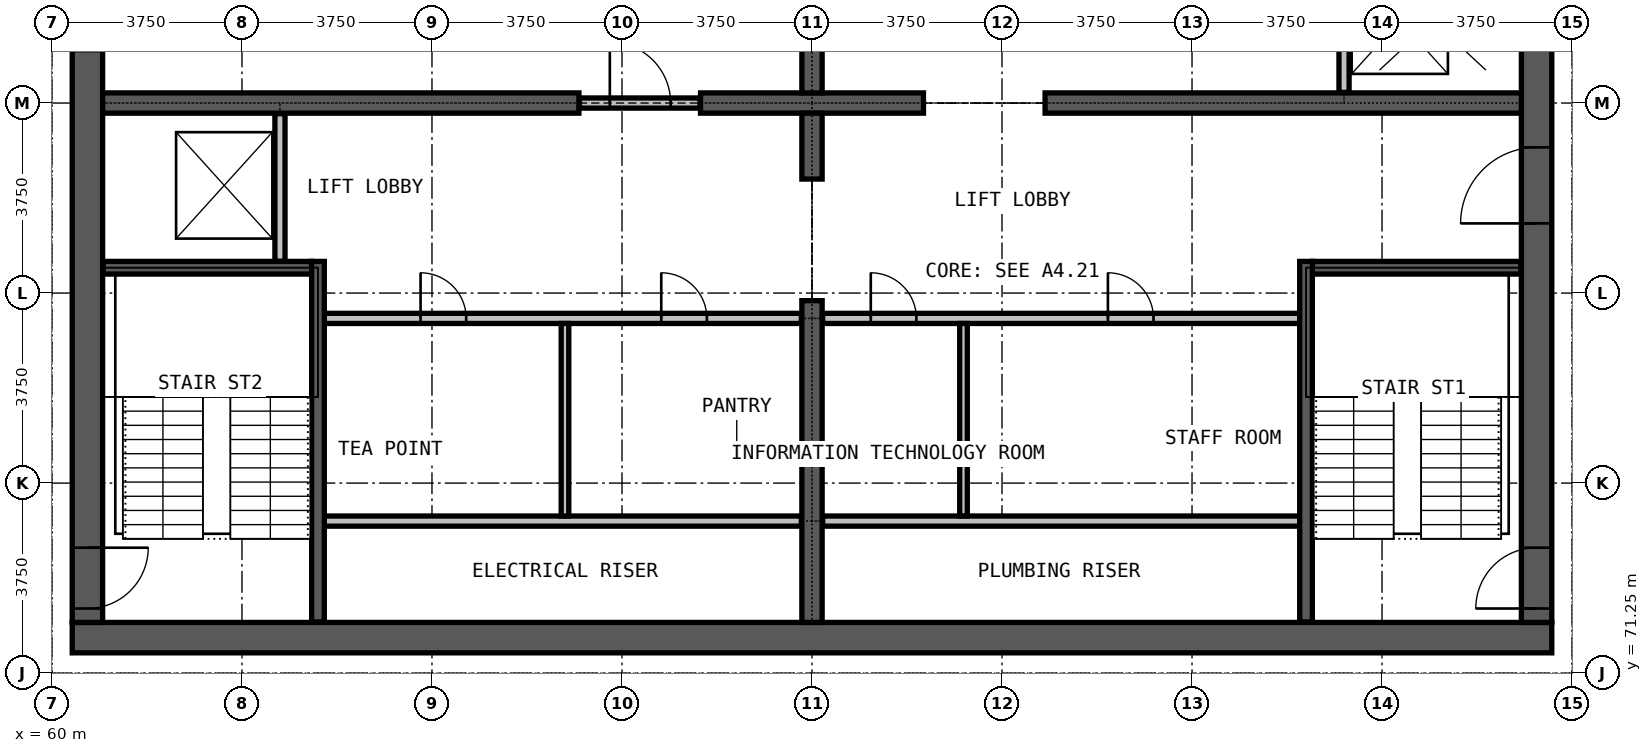
"""IFC4 building model, lengths in metres.
Left out: names, types, materials, properties, quantities, classifications, styles, units other than length and angle.
Written with IfcOpenShell. Run it as: python <this file> out.ifc"""

import sys

from ifc_helpers import new_model, si_unit, direction, frame, frame_2d, origin, place, context, subcontext, project, spatial, rectangle, extrude, element, fill, save


model = new_model("IFC4")
c1 = context("Model", 3, precision=1e-05, world=origin(), true_north=direction((0.0, 1.0)))
c2 = subcontext(c1, "Body", "Model", "MODEL_VIEW")
j1 = project(units=[si_unit("LENGTHUNIT", "METRE"), si_unit("PLANEANGLEUNIT", "RADIAN")], contexts=[c1])
p1 = place(None, origin())
s1 = spatial("IfcSite", under=j1, at=p1, CompositionType="ELEMENT")
p2 = place(p1, origin())
s2 = spatial("IfcBuilding", under=s1, at=p2, CompositionType="ELEMENT")
p3 = place(p2, frame((0.0, 0.0, 231.9)))
s3 = spatial("IfcBuildingStorey", under=s2, at=p3, CompositionType="ELEMENT", Elevation=231.9)
p4 = place(p3, frame((60.4, 71.95, 0.0), z_axis=(0.0, 0.0, 1.0), x_axis=(1.0, 0.0, 0.0)))
e1 = element("IfcWall", 1, at=p4, inside=s3, PredefinedType="SHEAR", context=c2, shape_type="SweptSolid", body=[
    extrude(rectangle(XDim=29.2, YDim=0.6, at=frame_2d((14.6, 0.0))), origin(), (0.0, 0.0, 1.0), 3.6),
])
p5 = place(p3, frame((89.3, 72.25, 0.0), z_axis=(0.0, 0.0, 1.0), x_axis=(0.0, 1.0, 0.0)))
e2 = element("IfcWall", 2, at=p5, inside=s3, PredefinedType="SHEAR", context=c2, shape_type="SweptSolid", body=[
    extrude(rectangle(XDim=20.5, YDim=0.6, at=frame_2d((10.25, 0.0))), origin(), (0.0, 0.0, 1.0), 3.6),
])
p6 = place(p5, frame((0.275, 0.0, 0.0)))
e3 = element("IfcOpeningElement", 3, at=p6, cuts=e2, PredefinedType="OPENING", context=c2, shape_type="SweptSolid", body=[
    extrude(rectangle(XDim=1.2, YDim=2.2, at=frame_2d((0.6, 1.1))), frame((0.0, 0.31, 0.0), z_axis=(0.0, -1.0, 0.0), x_axis=(1.0, 0.0, 0.0)), (0.0, 0.0, 1.0), 0.62),
])
p7 = place(p5, frame((13.775, 0.0, 0.0)))
e4 = element("IfcOpeningElement", 4, at=p7, cuts=e2, PredefinedType="OPENING", context=c2, shape_type="SweptSolid", body=[
    extrude(rectangle(XDim=1.2, YDim=2.2, at=frame_2d((0.6, 1.1))), frame((0.0, 0.31, 0.0), z_axis=(0.0, -1.0, 0.0), x_axis=(1.0, 0.0, 0.0)), (0.0, 0.0, 1.0), 0.62),
])
p8 = place(p5, frame((7.875, 0.0, 0.0)))
e5 = element("IfcOpeningElement", 5, at=p8, cuts=e2, PredefinedType="OPENING", context=c2, shape_type="SweptSolid", body=[
    extrude(rectangle(XDim=1.5, YDim=2.2, at=frame_2d((0.75, 1.1))), frame((0.0, 0.31, 0.0), z_axis=(0.0, -1.0, 0.0), x_axis=(1.0, 0.0, 0.0)), (0.0, 0.0, 1.0), 0.62),
])
p9 = place(p3, frame((60.7, 92.75, 0.0), z_axis=(0.0, 0.0, 1.0), x_axis=(0.0, -1.0, 0.0)))
e6 = element("IfcWall", 6, at=p9, inside=s3, PredefinedType="SHEAR", context=c2, shape_type="SweptSolid", body=[
    extrude(rectangle(XDim=20.5, YDim=0.6, at=frame_2d((10.25, 0.0))), origin(), (0.0, 0.0, 1.0), 3.6),
])
p10 = place(p9, frame((19.025, 0.0, 0.0)))
e7 = element("IfcOpeningElement", 7, at=p10, cuts=e6, PredefinedType="OPENING", context=c2, shape_type="SweptSolid", body=[
    extrude(rectangle(XDim=1.2, YDim=2.2, at=frame_2d((0.6, 1.1))), frame((0.0, 0.31, 0.0), z_axis=(0.0, -1.0, 0.0), x_axis=(1.0, 0.0, 0.0)), (0.0, 0.0, 1.0), 0.62),
])
p11 = place(p9, frame((8.025, 0.0, 0.0)))
e8 = element("IfcOpeningElement", 8, at=p11, cuts=e6, PredefinedType="OPENING", context=c2, shape_type="SweptSolid", body=[
    extrude(rectangle(XDim=1.2, YDim=2.2, at=frame_2d((0.6, 1.1))), frame((0.0, 0.31, 0.0), z_axis=(0.0, -1.0, 0.0), x_axis=(1.0, 0.0, 0.0)), (0.0, 0.0, 1.0), 0.62),
])
p12 = place(p3, frame((61.0, 82.5, 0.0), z_axis=(0.0, 0.0, 1.0), x_axis=(1.0, 0.0, 0.0)))
e9 = element("IfcWall", 9, at=p12, inside=s3, PredefinedType="SHEAR", context=c2, shape_type="SweptSolid", body=[
    extrude(rectangle(XDim=9.4, YDim=0.4, at=frame_2d((4.7, 0.0))), origin(), (0.0, 0.0, 1.0), 3.6),
])
p13 = place(p3, frame((72.8, 82.5, 0.0), z_axis=(0.0, 0.0, 1.0), x_axis=(1.0, 0.0, 0.0)))
e10 = element("IfcWall", 10, at=p13, inside=s3, PredefinedType="SHEAR", context=c2, shape_type="SweptSolid", body=[
    extrude(rectangle(XDim=4.4, YDim=0.4, at=frame_2d((2.2, 0.0))), origin(), (0.0, 0.0, 1.0), 3.6),
])
p14 = place(p3, frame((79.6, 82.5, 0.0), z_axis=(0.0, 0.0, 1.0), x_axis=(1.0, 0.0, 0.0)))
e11 = element("IfcWall", 11, at=p14, inside=s3, PredefinedType="SHEAR", context=c2, shape_type="SweptSolid", body=[
    extrude(rectangle(XDim=9.4, YDim=0.4, at=frame_2d((4.7, 0.0))), origin(), (0.0, 0.0, 1.0), 3.6),
])
p15 = place(p3, frame((75.0, 72.25, 0.0), z_axis=(0.0, 0.0, 1.0), x_axis=(0.0, 1.0, 0.0)))
e12 = element("IfcWall", 12, at=p15, inside=s3, PredefinedType="SHEAR", context=c2, shape_type="SweptSolid", body=[
    extrude(rectangle(XDim=6.35, YDim=0.4, at=frame_2d((3.175, 0.0))), origin(), (0.0, 0.0, 1.0), 3.6),
])
for number, where, z_axis, x_axis in (
    (13, (75.0, 81.0, 0.0), (0.0, 0.0, 1.0), (0.0, 1.0, 0.0)),
    (14, (75.0, 82.7, 0.0), (0.0, 0.0, 1.0), (0.0, 1.0, 0.0)),
):
    element("IfcWall", number, at=place(p3, frame(where, z_axis=z_axis, x_axis=x_axis)), inside=s3, PredefinedType="SHEAR", context=c2, shape_type="SweptSolid", body=[
        extrude(rectangle(XDim=1.3, YDim=0.4, at=frame_2d((0.65, 0.0))), origin(), (0.0, 0.0, 1.0), 3.6),
    ])
for number, where, z_axis, x_axis in (
    (15, (65.375, 74.25, 0.0), (0.0, 0.0, 1.0), (1.0, 0.0, 0.0)),
    (16, (75.21, 74.25, 0.0), (0.0, 0.0, 1.0), (1.0, 0.0, 0.0)),
):
    element("IfcWall", number, at=place(p3, frame(where, z_axis=z_axis, x_axis=x_axis)), inside=s3, PredefinedType="PARTITIONING", context=c2, shape_type="SweptSolid", body=[
        extrude(rectangle(XDim=9.415, YDim=0.2, at=frame_2d((4.708, 0.0))), origin(), (0.0, 0.0, 1.0), 3.3),
    ])
p16 = place(p3, frame((65.375, 78.25, 0.0), z_axis=(0.0, 0.0, 1.0), x_axis=(1.0, 0.0, 0.0)))
e17 = element("IfcWall", 17, at=p16, inside=s3, PredefinedType="PARTITIONING", context=c2, shape_type="SweptSolid", body=[
    extrude(rectangle(XDim=9.415, YDim=0.2, at=frame_2d((4.708, 0.0))), origin(), (0.0, 0.0, 1.0), 3.3),
])
p17 = place(p16, frame((1.9, 0.0, 0.0)))
e18 = element("IfcOpeningElement", 18, at=p17, cuts=e17, PredefinedType="OPENING", context=c2, shape_type="SweptSolid", body=[
    extrude(rectangle(XDim=0.9, YDim=2.2, at=frame_2d((0.45, 1.1))), frame((0.0, 0.11, 0.0), z_axis=(0.0, -1.0, 0.0), x_axis=(1.0, 0.0, 0.0)), (0.0, 0.0, 1.0), 0.22),
])
p18 = place(p16, frame((6.65, 0.0, 0.0)))
e19 = element("IfcOpeningElement", 19, at=p18, cuts=e17, PredefinedType="OPENING", context=c2, shape_type="SweptSolid", body=[
    extrude(rectangle(XDim=0.9, YDim=2.2, at=frame_2d((0.45, 1.1))), frame((0.0, 0.11, 0.0), z_axis=(0.0, -1.0, 0.0), x_axis=(1.0, 0.0, 0.0)), (0.0, 0.0, 1.0), 0.22),
])
p19 = place(p3, frame((75.21, 78.25, 0.0), z_axis=(0.0, 0.0, 1.0), x_axis=(1.0, 0.0, 0.0)))
e20 = element("IfcWall", 20, at=p19, inside=s3, PredefinedType="PARTITIONING", context=c2, shape_type="SweptSolid", body=[
    extrude(rectangle(XDim=9.415, YDim=0.2, at=frame_2d((4.708, 0.0))), origin(), (0.0, 0.0, 1.0), 3.3),
])
p20 = place(p19, frame((0.95, 0.0, 0.0)))
e21 = element("IfcOpeningElement", 21, at=p20, cuts=e20, PredefinedType="OPENING", context=c2, shape_type="SweptSolid", body=[
    extrude(rectangle(XDim=0.9, YDim=2.2, at=frame_2d((0.45, 1.1))), frame((0.0, 0.11, 0.0), z_axis=(0.0, -1.0, 0.0), x_axis=(1.0, 0.0, 0.0)), (0.0, 0.0, 1.0), 0.22),
])
p21 = place(p19, frame((5.63, 0.0, 0.0)))
e22 = element("IfcOpeningElement", 22, at=p21, cuts=e20, PredefinedType="OPENING", context=c2, shape_type="SweptSolid", body=[
    extrude(rectangle(XDim=0.9, YDim=2.2, at=frame_2d((0.45, 1.1))), frame((0.0, 0.11, 0.0), z_axis=(0.0, -1.0, 0.0), x_axis=(1.0, 0.0, 0.0)), (0.0, 0.0, 1.0), 0.22),
])
p22 = place(p3, frame((70.41, 82.5, 0.0), z_axis=(0.0, 0.0, 1.0), x_axis=(1.0, 0.0, 0.0)))
e23 = element("IfcWall", 23, at=p22, inside=s3, PredefinedType="PARTITIONING", context=c2, shape_type="SweptSolid", body=[
    extrude(rectangle(XDim=2.38, YDim=0.2, at=frame_2d((1.19, 0.0))), origin(), (0.0, 0.0, 1.0), 2.4),
])
p23 = place(p22, frame((0.6, 0.0, 0.0)))
e24 = element("IfcOpeningElement", 24, at=p23, cuts=e23, PredefinedType="OPENING", context=c2, shape_type="SweptSolid", body=[
    extrude(rectangle(XDim=1.2, YDim=2.2, at=frame_2d((0.6, 1.1))), frame((0.0, 0.11, 0.0), z_axis=(0.0, -1.0, 0.0), x_axis=(1.0, 0.0, 0.0)), (0.0, 0.0, 1.0), 0.22),
])
for number, where, z_axis, x_axis in (
    (25, (70.125, 74.35, 0.0), (0.0, 0.0, 1.0), (0.0, 1.0, 0.0)),
    (26, (77.99, 74.35, 0.0), (0.0, 0.0, 1.0), (0.0, 1.0, 0.0)),
):
    element("IfcWall", number, at=place(p3, frame(where, z_axis=z_axis, x_axis=x_axis)), inside=s3, PredefinedType="PARTITIONING", context=c2, shape_type="SweptSolid", body=[
        extrude(rectangle(XDim=3.8, YDim=0.15, at=frame_2d((1.9, 0.0))), origin(), (0.0, 0.0, 1.0), 3.3),
    ])
p24 = place(p3, frame((64.5, 79.375, 0.0), z_axis=(0.0, 0.0, 1.0), x_axis=(0.0, 1.0, 0.0)))
e27 = element("IfcWall", 27, at=p24, inside=s3, PredefinedType="PARTITIONING", context=c2, shape_type="SweptSolid", body=[
    extrude(rectangle(XDim=2.915, YDim=0.2, at=frame_2d((1.458, 0.0))), origin(), (0.0, 0.0, 1.0), 3.3),
])
p25 = place(p3, frame((85.5, 82.71, 0.0), z_axis=(0.0, 0.0, 1.0), x_axis=(0.0, 1.0, 0.0)))
e28 = element("IfcWall", 28, at=p25, inside=s3, PredefinedType="PARTITIONING", context=c2, shape_type="SweptSolid", body=[
    extrude(rectangle(XDim=2.915, YDim=0.2, at=frame_2d((1.458, 0.0))), origin(), (0.0, 0.0, 1.0), 3.3),
])
p26 = place(p25, frame((0.9, 0.0, 0.0)))
e29 = element("IfcOpeningElement", 29, at=p26, cuts=e28, PredefinedType="OPENING", context=c2, shape_type="SweptSolid", body=[
    extrude(rectangle(XDim=1.1, YDim=2.2, at=frame_2d((0.55, 1.1))), frame((0.0, 0.11, 0.0), z_axis=(0.0, -1.0, 0.0), x_axis=(1.0, 0.0, 0.0)), (0.0, 0.0, 1.0), 0.22),
])
for number, where, z_axis, x_axis in (
    (30, (61.01, 79.25, 0.0), (0.0, 0.0, 1.0), (1.0, 0.0, 0.0)),
    (31, (84.875, 79.25, 0.0), (0.0, 0.0, 1.0), (1.0, 0.0, 0.0)),
):
    element("IfcWall", number, at=place(p3, frame(where, z_axis=z_axis, x_axis=x_axis)), inside=s3, PredefinedType="PARTITIONING", context=c2, shape_type="SweptSolid", body=[
        extrude(rectangle(XDim=4.115, YDim=0.25, at=frame_2d((2.058, 0.0))), origin(), (0.0, 0.0, 1.0), 3.3),
    ])
for number, where, z_axis, x_axis in (
    (32, (65.25, 72.26, 0.0), (0.0, 0.0, 1.0), (0.0, 1.0, 0.0)),
    (33, (84.75, 72.26, 0.0), (0.0, 0.0, 1.0), (0.0, 1.0, 0.0)),
):
    element("IfcWall", number, at=place(p3, frame(where, z_axis=z_axis, x_axis=x_axis)), inside=s3, PredefinedType="PARTITIONING", context=c2, shape_type="SweptSolid", body=[
        extrude(rectangle(XDim=7.115, YDim=0.25, at=frame_2d((3.558, 0.0))), origin(), (0.0, 0.0, 1.0), 3.3),
    ])
p27 = place(p23, origin())
e34 = element("IfcDoor", 34, at=p27, inside=s3, OperationType="SINGLE_SWING_RIGHT", PredefinedType="DOOR", context=c2, shape_type="SweptSolid", body=[
    extrude(rectangle(XDim=1.2, YDim=2.2, at=frame_2d((0.6, 1.1))), frame((0.0, 0.025, 0.0), z_axis=(0.0, -1.0, 0.0), x_axis=(1.0, 0.0, 0.0)), (0.0, 0.0, 1.0), 0.05),
])
fill(e24, e34)
p28 = place(p6, origin())
e35 = element("IfcDoor", 35, at=p28, inside=s3, OperationType="SINGLE_SWING_RIGHT", PredefinedType="DOOR", context=c2, shape_type="SweptSolid", body=[
    extrude(rectangle(XDim=1.2, YDim=2.2, at=frame_2d((0.6, 1.1))), frame((0.0, 0.025, 0.0), z_axis=(0.0, -1.0, 0.0), x_axis=(1.0, 0.0, 0.0)), (0.0, 0.0, 1.0), 0.05),
])
fill(e3, e35)
p29 = place(p10, origin())
e36 = element("IfcDoor", 36, at=p29, inside=s3, OperationType="SINGLE_SWING_LEFT", PredefinedType="DOOR", context=c2, shape_type="SweptSolid", body=[
    extrude(rectangle(XDim=1.2, YDim=2.2, at=frame_2d((0.6, 1.1))), frame((0.0, 0.025, 0.0), z_axis=(0.0, -1.0, 0.0), x_axis=(1.0, 0.0, 0.0)), (0.0, 0.0, 1.0), 0.05),
])
fill(e7, e36)
p30 = place(p8, origin())
e37 = element("IfcDoor", 37, at=p30, inside=s3, OperationType="DOUBLE_DOOR_SINGLE_SWING", PredefinedType="DOOR", context=c2, shape_type="SweptSolid", body=[
    extrude(rectangle(XDim=1.5, YDim=2.2, at=frame_2d((0.75, 1.1))), frame((0.0, 0.025, 0.0), z_axis=(0.0, -1.0, 0.0), x_axis=(1.0, 0.0, 0.0)), (0.0, 0.0, 1.0), 0.05),
])
fill(e5, e37)
p31 = place(p17, origin())
e38 = element("IfcDoor", 38, at=p31, inside=s3, OperationType="SINGLE_SWING_LEFT", PredefinedType="DOOR", context=c2, shape_type="SweptSolid", body=[
    extrude(rectangle(XDim=0.9, YDim=2.2, at=frame_2d((0.45, 1.1))), frame((0.0, 0.025, 0.0), z_axis=(0.0, -1.0, 0.0), x_axis=(1.0, 0.0, 0.0)), (0.0, 0.0, 1.0), 0.05),
])
fill(e18, e38)
p32 = place(p18, origin())
e39 = element("IfcDoor", 39, at=p32, inside=s3, OperationType="SINGLE_SWING_LEFT", PredefinedType="DOOR", context=c2, shape_type="SweptSolid", body=[
    extrude(rectangle(XDim=0.9, YDim=2.2, at=frame_2d((0.45, 1.1))), frame((0.0, 0.025, 0.0), z_axis=(0.0, -1.0, 0.0), x_axis=(1.0, 0.0, 0.0)), (0.0, 0.0, 1.0), 0.05),
])
fill(e19, e39)
p33 = place(p20, origin())
e40 = element("IfcDoor", 40, at=p33, inside=s3, OperationType="SINGLE_SWING_LEFT", PredefinedType="DOOR", context=c2, shape_type="SweptSolid", body=[
    extrude(rectangle(XDim=0.9, YDim=2.2, at=frame_2d((0.45, 1.1))), frame((0.0, 0.025, 0.0), z_axis=(0.0, -1.0, 0.0), x_axis=(1.0, 0.0, 0.0)), (0.0, 0.0, 1.0), 0.05),
])
fill(e21, e40)
p34 = place(p21, origin())
e41 = element("IfcDoor", 41, at=p34, inside=s3, OperationType="SINGLE_SWING_LEFT", PredefinedType="DOOR", context=c2, shape_type="SweptSolid", body=[
    extrude(rectangle(XDim=0.9, YDim=2.2, at=frame_2d((0.45, 1.1))), frame((0.0, 0.025, 0.0), z_axis=(0.0, -1.0, 0.0), x_axis=(1.0, 0.0, 0.0)), (0.0, 0.0, 1.0), 0.05),
])
fill(e22, e41)
save(model, sys.argv[1])
